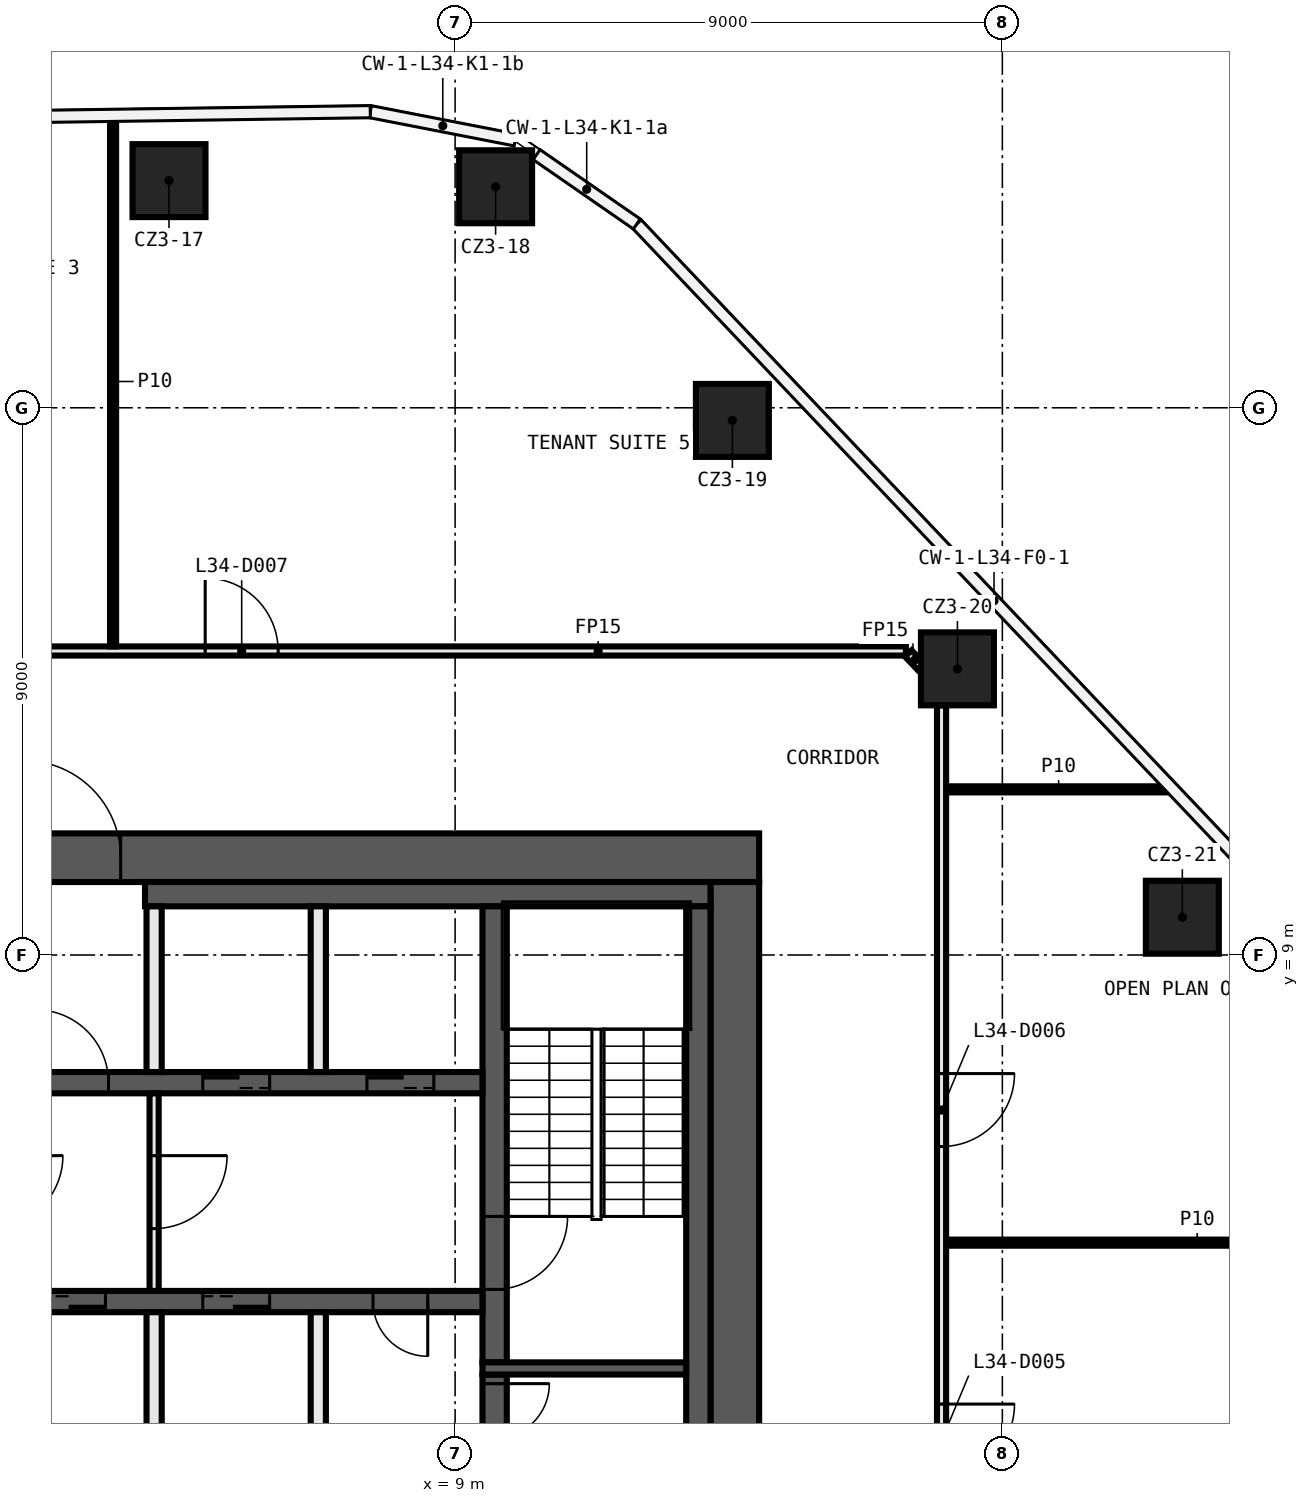
"""IFC4 building model, lengths in metres.
Left out: names, types, materials, properties, quantities, classifications, styles, units other than length and angle.
Written with IfcOpenShell. Run it as: python <this file> out.ifc"""

import sys

from ifc_helpers import new_model, si_unit, direction, frame, frame_2d, origin, origin_2d, place, context, subcontext, project, spatial, rectangle, extrude, element, fill, save


model = new_model("IFC4")
c1 = context("Model", 3, precision=1e-05, world=origin(), true_north=direction((0.0, 1.0)))
c2 = subcontext(c1, "Body", "Model", "MODEL_VIEW")
j1 = project(units=[si_unit("LENGTHUNIT", "METRE"), si_unit("PLANEANGLEUNIT", "RADIAN")], contexts=[c1])
p1 = place(None, origin())
s1 = spatial("IfcSite", under=j1, at=p1, CompositionType="ELEMENT")
p2 = place(p1, origin())
s2 = spatial("IfcBuilding", under=s1, at=p2, CompositionType="ELEMENT")
p3 = place(p2, frame((0.0, 0.0, 158.6)))
s3 = spatial("IfcBuildingStorey", under=s2, at=p3, CompositionType="ELEMENT", Elevation=158.6)
for number, where, z_axis, x_axis in (
    (1, (4.295, 21.736, 0.0), (0.0, 0.0, 1.0), (1.0, 0.0, 0.0)),
    (2, (9.666, 21.635, 0.0), (0.0, 0.0, 1.0), (1.0, 0.0, 0.0)),
    (3, (13.56, 17.792, 0.0), (0.0, 0.0, 1.0), (1.0, 0.0, 0.0)),
    (4, (17.261, 13.706, 0.0), (0.0, 0.0, 1.0), (1.0, 0.0, 0.0)),
    (5, (20.96, 9.621, 0.0), (0.0, 0.0, 1.0), (1.0, 0.0, 0.0)),
):
    element("IfcColumn", number, at=place(p3, frame(where, z_axis=z_axis, x_axis=x_axis)), inside=s3, PredefinedType="COLUMN", context=c2, shape_type="SweptSolid", body=[
        extrude(rectangle(XDim=1.2, YDim=1.2, at=origin_2d()), origin(), (0.0, 0.0, 1.0), 3.82),
    ])
p4 = place(p3, frame((17.075, 4.269, 0.0), z_axis=(0.0, 0.0, 1.0), x_axis=(1.0, 0.0, 0.0)))
e6 = element("IfcWall", 6, at=p4, inside=s3, PredefinedType="PARTITIONING", context=c2, shape_type="SweptSolid", body=[
    extrude(rectangle(XDim=8.259, YDim=0.1, at=frame_2d((4.129, 0.0))), origin(), (0.0, 0.0, 1.0), 3.82),
])
p5 = place(p3, frame((17.075, 11.724, 0.0), z_axis=(0.0, 0.0, 1.0), x_axis=(1.0, 0.0, 0.0)))
e7 = element("IfcWall", 7, at=p5, inside=s3, PredefinedType="PARTITIONING", context=c2, shape_type="SweptSolid", body=[
    extrude(rectangle(XDim=3.701, YDim=0.1, at=frame_2d((1.851, 0.0))), origin(), (0.0, 0.0, 1.0), 3.82),
])
p6 = place(p3, frame((-9.075, 14.0, 0.0), z_axis=(0.0, 0.0, 1.0), x_axis=(1.0, 0.0, 0.0)))
e8 = element("IfcWall", 8, at=p6, inside=s3, PredefinedType="PARTITIONING", context=c2, shape_type="SweptSolid", body=[
    extrude(rectangle(XDim=25.489, YDim=0.15, at=frame_2d((12.745, 0.0))), origin(), (0.0, 0.0, 1.0), 3.82),
])
p7 = place(p6, frame((13.965, 0.0, 0.0)))
e9 = element("IfcOpeningElement", 9, at=p7, cuts=e8, PredefinedType="OPENING", context=c2, shape_type="SweptSolid", body=[
    extrude(rectangle(XDim=1.2, YDim=2.1, at=frame_2d((0.6, 1.05))), frame((0.0, 0.085, 0.0), z_axis=(0.0, -1.0, 0.0), x_axis=(1.0, 0.0, 0.0)), (0.0, 0.0, 1.0), 0.17),
])
p8 = place(p6, frame((9.73, 0.0, 0.0)))
e10 = element("IfcOpeningElement", 10, at=p8, cuts=e8, PredefinedType="OPENING", context=c2, shape_type="SweptSolid", body=[
    extrude(rectangle(XDim=1.2, YDim=2.1, at=frame_2d((0.6, 1.05))), frame((0.0, 0.085, 0.0), z_axis=(0.0, -1.0, 0.0), x_axis=(1.0, 0.0, 0.0)), (0.0, 0.0, 1.0), 0.17),
])
p9 = place(p6, frame((5.49, 0.0, 0.0)))
e11 = element("IfcOpeningElement", 11, at=p9, cuts=e8, PredefinedType="OPENING", context=c2, shape_type="SweptSolid", body=[
    extrude(rectangle(XDim=1.2, YDim=2.1, at=frame_2d((0.6, 1.05))), frame((0.0, 0.085, 0.0), z_axis=(0.0, -1.0, 0.0), x_axis=(1.0, 0.0, 0.0)), (0.0, 0.0, 1.0), 0.17),
])
p10 = place(p3, frame((17.0, 13.106, 0.0), z_axis=(0.0, 0.0, 1.0), x_axis=(0.0, -1.0, 0.0)))
e12 = element("IfcWall", 12, at=p10, inside=s3, PredefinedType="PARTITIONING", context=c2, shape_type="SweptSolid", body=[
    extrude(rectangle(XDim=23.172, YDim=0.15, at=frame_2d((11.586, 0.0))), origin(), (0.0, 0.0, 1.0), 3.82),
])
p11 = place(p10, frame((11.492, 0.0, 0.0)))
e13 = element("IfcOpeningElement", 13, at=p11, cuts=e12, PredefinedType="OPENING", context=c2, shape_type="SweptSolid", body=[
    extrude(rectangle(XDim=1.2, YDim=2.1, at=frame_2d((0.6, 1.05))), frame((0.0, 0.085, 0.0), z_axis=(0.0, -1.0, 0.0), x_axis=(1.0, 0.0, 0.0)), (0.0, 0.0, 1.0), 0.17),
])
p12 = place(p10, frame((6.056, 0.0, 0.0)))
e14 = element("IfcOpeningElement", 14, at=p12, cuts=e12, PredefinedType="OPENING", context=c2, shape_type="SweptSolid", body=[
    extrude(rectangle(XDim=1.2, YDim=2.1, at=frame_2d((0.6, 1.05))), frame((0.0, 0.085, 0.0), z_axis=(0.0, -1.0, 0.0), x_axis=(1.0, 0.0, 0.0)), (0.0, 0.0, 1.0), 0.17),
])
p13 = place(p3, frame((3.375, 14.075, 0.0), z_axis=(0.0, 0.0, 1.0), x_axis=(0.0, 1.0, 0.0)))
e15 = element("IfcWall", 15, at=p13, inside=s3, PredefinedType="PARTITIONING", context=c2, shape_type="SweptSolid", body=[
    extrude(rectangle(XDim=8.715, YDim=0.1, at=frame_2d((4.357, 0.0))), origin(), (0.0, 0.0, 1.0), 3.82),
])
p14 = place(p3, frame((16.453, 13.959, 0.0), z_axis=(0.0, 0.0, 1.0), x_axis=(0.687856738642, -0.725846476264, 0.0)))
e16 = element("IfcWall", 16, at=p14, inside=s3, PredefinedType="PARTITIONING", context=c2, shape_type="SweptSolid", body=[
    extrude(rectangle(XDim=0.302, YDim=0.15, at=frame_2d((0.151, 0.0))), origin(), (0.0, 0.0, 1.0), 3.82),
])
p15 = place(p3, frame((-14.0, 10.6, 0.0), z_axis=(0.0, 0.0, 1.0), x_axis=(1.0, 0.0, 0.0)))
e17 = element("IfcWall", 17, at=p15, inside=s3, PredefinedType="SHEAR", context=c2, shape_type="SweptSolid", body=[
    extrude(rectangle(XDim=28.0, YDim=0.8, at=frame_2d((14.0, 0.0))), origin(), (0.0, 0.0, 1.0), 3.82),
])
p16 = place(p15, frame((15.9, 0.0, 0.0)))
e18 = element("IfcOpeningElement", 18, at=p16, cuts=e17, PredefinedType="OPENING", context=c2, shape_type="SweptSolid", body=[
    extrude(rectangle(XDim=1.6, YDim=2.1, at=frame_2d((0.8, 1.05))), frame((0.0, 0.41, 0.0), z_axis=(0.0, -1.0, 0.0), x_axis=(1.0, 0.0, 0.0)), (0.0, 0.0, 1.0), 0.82),
])
p17 = place(p3, frame((13.6, 10.2, 0.0), z_axis=(0.0, 0.0, 1.0), x_axis=(0.0, -1.0, 0.0)))
e19 = element("IfcWall", 19, at=p17, inside=s3, PredefinedType="SHEAR", context=c2, shape_type="SweptSolid", body=[
    extrude(rectangle(XDim=20.4, YDim=0.8, at=frame_2d((10.2, 0.0))), origin(), (0.0, 0.0, 1.0), 3.82),
])
p18 = place(p3, frame((3.9, 10.0, 0.0), z_axis=(0.0, 0.0, 1.0), x_axis=(1.0, 0.0, 0.0)))
e20 = element("IfcWall", 20, at=p18, inside=s3, PredefinedType="SHEAR", context=c2, shape_type="SweptSolid", body=[
    extrude(rectangle(XDim=9.3, YDim=0.4, at=frame_2d((4.65, 0.0))), origin(), (0.0, 0.0, 1.0), 3.82),
])
p19 = place(p3, frame((13.0, 9.8, 0.0), z_axis=(0.0, 0.0, 1.0), x_axis=(0.0, -1.0, 0.0)))
e21 = element("IfcWall", 21, at=p19, inside=s3, PredefinedType="SHEAR", context=c2, shape_type="SweptSolid", body=[
    extrude(rectangle(XDim=19.6, YDim=0.4, at=frame_2d((9.8, 0.0))), origin(), (0.0, 0.0, 1.0), 3.82),
])
p20 = place(p3, frame((9.65, 2.1, 0.0), z_axis=(0.0, 0.0, 1.0), x_axis=(0.0, -1.0, 0.0)))
e22 = element("IfcWall", 22, at=p20, inside=s3, PredefinedType="SHEAR", context=c2, shape_type="SweptSolid", body=[
    extrude(rectangle(XDim=4.2, YDim=0.4, at=frame_2d((2.1, 0.0))), origin(), (0.0, 0.0, 1.0), 3.82),
])
p21 = place(p20, frame((0.15, 0.0, 0.0)))
e23 = element("IfcOpeningElement", 23, at=p21, cuts=e22, PredefinedType="OPENING", context=c2, shape_type="SweptSolid", body=[
    extrude(rectangle(XDim=0.9, YDim=2.1, at=frame_2d((0.45, 1.05))), frame((0.0, 0.21, 0.0), z_axis=(0.0, -1.0, 0.0), x_axis=(1.0, 0.0, 0.0)), (0.0, 0.0, 1.0), 0.42),
])
p22 = place(p3, frame((9.65, 9.8, 0.0), z_axis=(0.0, 0.0, 1.0), x_axis=(0.0, -1.0, 0.0)))
e24 = element("IfcWall", 24, at=p22, inside=s3, PredefinedType="SHEAR", context=c2, shape_type="SweptSolid", body=[
    extrude(rectangle(XDim=7.5, YDim=0.4, at=frame_2d((3.75, 0.0))), origin(), (0.0, 0.0, 1.0), 3.82),
])
p23 = place(p22, frame((5.1, 0.0, 0.0)))
e25 = element("IfcOpeningElement", 25, at=p23, cuts=e24, PredefinedType="OPENING", context=c2, shape_type="SweptSolid", body=[
    extrude(rectangle(XDim=1.2, YDim=2.1, at=frame_2d((0.6, 1.05))), frame((0.0, 0.21, 0.0), z_axis=(0.0, -1.0, 0.0), x_axis=(1.0, 0.0, 0.0)), (0.0, 0.0, 1.0), 0.42),
])
p24 = place(p3, frame((9.45, 2.2, 0.0), z_axis=(0.0, 0.0, 1.0), x_axis=(1.0, 0.0, 0.0)))
e26 = element("IfcWall", 26, at=p24, inside=s3, PredefinedType="SHEAR", context=c2, shape_type="SweptSolid", body=[
    extrude(rectangle(XDim=3.35, YDim=0.2, at=frame_2d((1.675, 0.0))), origin(), (0.0, 0.0, 1.0), 3.82),
])
p25 = place(p3, frame((-9.45, 6.9, 0.0), z_axis=(0.0, 0.0, 1.0), x_axis=(1.0, 0.0, 0.0)))
e27 = element("IfcWall", 27, at=p25, inside=s3, PredefinedType="SHEAR", context=c2, shape_type="SweptSolid", body=[
    extrude(rectangle(XDim=18.9, YDim=0.35, at=frame_2d((9.45, 0.0))), origin(), (0.0, 0.0, 1.0), 3.82),
])
p26 = place(p25, frame((11.55, 0.0, 0.0)))
e28 = element("IfcOpeningElement", 28, at=p26, cuts=e27, PredefinedType="OPENING", context=c2, shape_type="SweptSolid", body=[
    extrude(rectangle(XDim=1.2, YDim=2.1, at=frame_2d((0.6, 1.05))), frame((0.0, 0.185, 0.0), z_axis=(0.0, -1.0, 0.0), x_axis=(1.0, 0.0, 0.0)), (0.0, 0.0, 1.0), 0.37),
])
p27 = place(p25, frame((14.3, 0.0, 0.0)))
e29 = element("IfcOpeningElement", 29, at=p27, cuts=e27, PredefinedType="OPENING", context=c2, shape_type="SweptSolid", body=[
    extrude(rectangle(XDim=1.1, YDim=2.1, at=frame_2d((0.55, 1.05))), frame((0.0, 0.185, 0.0), z_axis=(0.0, -1.0, 0.0), x_axis=(1.0, 0.0, 0.0)), (0.0, 0.0, 1.0), 0.37),
])
p28 = place(p25, frame((17.0, 0.0, 0.0)))
e30 = element("IfcOpeningElement", 30, at=p28, cuts=e27, PredefinedType="OPENING", context=c2, shape_type="SweptSolid", body=[
    extrude(rectangle(XDim=1.1, YDim=2.1, at=frame_2d((0.55, 1.05))), frame((0.0, 0.185, 0.0), z_axis=(0.0, -1.0, 0.0), x_axis=(1.0, 0.0, 0.0)), (0.0, 0.0, 1.0), 0.37),
])
p29 = place(p25, frame((2.25, 0.0, 0.0)))
e31 = element("IfcOpeningElement", 31, at=p29, cuts=e27, PredefinedType="OPENING", context=c2, shape_type="SweptSolid", body=[
    extrude(rectangle(XDim=0.9, YDim=2.1, at=frame_2d((0.45, 1.05))), frame((0.0, 0.185, 0.0), z_axis=(0.0, -1.0, 0.0), x_axis=(1.0, 0.0, 0.0)), (0.0, 0.0, 1.0), 0.37),
])
p30 = place(p25, frame((6.3, 0.0, 0.0)))
e32 = element("IfcOpeningElement", 32, at=p30, cuts=e27, PredefinedType="OPENING", context=c2, shape_type="SweptSolid", body=[
    extrude(rectangle(XDim=0.9, YDim=2.1, at=frame_2d((0.45, 1.05))), frame((0.0, 0.185, 0.0), z_axis=(0.0, -1.0, 0.0), x_axis=(1.0, 0.0, 0.0)), (0.0, 0.0, 1.0), 0.37),
])
p31 = place(p25, frame((9.0, 0.0, 0.0)))
e33 = element("IfcOpeningElement", 33, at=p31, cuts=e27, PredefinedType="OPENING", context=c2, shape_type="SweptSolid", body=[
    extrude(rectangle(XDim=0.9, YDim=2.1, at=frame_2d((0.45, 1.05))), frame((0.0, 0.185, 0.0), z_axis=(0.0, -1.0, 0.0), x_axis=(1.0, 0.0, 0.0)), (0.0, 0.0, 1.0), 0.37),
])
p32 = place(p3, frame((9.45, 3.3, 0.0), z_axis=(0.0, 0.0, 1.0), x_axis=(-1.0, 0.0, 0.0)))
e34 = element("IfcWall", 34, at=p32, inside=s3, PredefinedType="SHEAR", context=c2, shape_type="SweptSolid", body=[
    extrude(rectangle(XDim=18.9, YDim=0.35, at=frame_2d((9.45, 0.0))), origin(), (0.0, 0.0, 1.0), 3.82),
])
p33 = place(p32, frame((6.2, 0.0, 0.0)))
e35 = element("IfcOpeningElement", 35, at=p33, cuts=e34, PredefinedType="OPENING", context=c2, shape_type="SweptSolid", body=[
    extrude(rectangle(XDim=1.1, YDim=2.1, at=frame_2d((0.55, 1.05))), frame((0.0, 0.185, 0.0), z_axis=(0.0, -1.0, 0.0), x_axis=(1.0, 0.0, 0.0)), (0.0, 0.0, 1.0), 0.37),
])
p34 = place(p32, frame((3.5, 0.0, 0.0)))
e36 = element("IfcOpeningElement", 36, at=p34, cuts=e34, PredefinedType="OPENING", context=c2, shape_type="SweptSolid", body=[
    extrude(rectangle(XDim=1.1, YDim=2.1, at=frame_2d((0.55, 1.05))), frame((0.0, 0.185, 0.0), z_axis=(0.0, -1.0, 0.0), x_axis=(1.0, 0.0, 0.0)), (0.0, 0.0, 1.0), 0.37),
])
p35 = place(p32, frame((0.9, 0.0, 0.0)))
e37 = element("IfcOpeningElement", 37, at=p35, cuts=e34, PredefinedType="OPENING", context=c2, shape_type="SweptSolid", body=[
    extrude(rectangle(XDim=0.9, YDim=2.1, at=frame_2d((0.45, 1.05))), frame((0.0, 0.185, 0.0), z_axis=(0.0, -1.0, 0.0), x_axis=(1.0, 0.0, 0.0)), (0.0, 0.0, 1.0), 0.37),
])
p36 = place(p32, frame((15.75, 0.0, 0.0)))
e38 = element("IfcOpeningElement", 38, at=p36, cuts=e34, PredefinedType="OPENING", context=c2, shape_type="SweptSolid", body=[
    extrude(rectangle(XDim=0.9, YDim=2.1, at=frame_2d((0.45, 1.05))), frame((0.0, 0.185, 0.0), z_axis=(0.0, -1.0, 0.0), x_axis=(1.0, 0.0, 0.0)), (0.0, 0.0, 1.0), 0.37),
])
p37 = place(p32, frame((11.7, 0.0, 0.0)))
e39 = element("IfcOpeningElement", 39, at=p37, cuts=e34, PredefinedType="OPENING", context=c2, shape_type="SweptSolid", body=[
    extrude(rectangle(XDim=0.9, YDim=2.1, at=frame_2d((0.45, 1.05))), frame((0.0, 0.185, 0.0), z_axis=(0.0, -1.0, 0.0), x_axis=(1.0, 0.0, 0.0)), (0.0, 0.0, 1.0), 0.37),
])
p38 = place(p32, frame((9.0, 0.0, 0.0)))
e40 = element("IfcOpeningElement", 40, at=p38, cuts=e34, PredefinedType="OPENING", context=c2, shape_type="SweptSolid", body=[
    extrude(rectangle(XDim=0.9, YDim=2.1, at=frame_2d((0.45, 1.05))), frame((0.0, 0.185, 0.0), z_axis=(0.0, -1.0, 0.0), x_axis=(1.0, 0.0, 0.0)), (0.0, 0.0, 1.0), 0.37),
])
for number, where, z_axis, x_axis in (
    (41, (6.75, 0.4, 0.0), (0.0, 0.0, 1.0), (0.0, 1.0, 0.0)),
    (42, (6.75, 7.075, 0.0), (0.0, 0.0, 1.0), (0.0, 1.0, 0.0)),
):
    element("IfcWall", number, at=place(p3, frame(where, z_axis=z_axis, x_axis=x_axis)), inside=s3, PredefinedType="SOLIDWALL", context=c2, shape_type="SweptSolid", body=[
        extrude(rectangle(XDim=2.725, YDim=0.25, at=frame_2d((1.363, 0.0))), origin(), (0.0, 0.0, 1.0), 3.82),
    ])
p39 = place(p3, frame((4.05, 6.725, 0.0), z_axis=(0.0, 0.0, 1.0), x_axis=(0.0, -1.0, 0.0)))
e43 = element("IfcWall", 43, at=p39, inside=s3, PredefinedType="PARTITIONING", context=c2, shape_type="SweptSolid", body=[
    extrude(rectangle(XDim=3.25, YDim=0.15, at=frame_2d((1.625, 0.0))), origin(), (0.0, 0.0, 1.0), 3.82),
])
p40 = place(p39, frame((1.025, 0.0, 0.0)))
e44 = element("IfcOpeningElement", 44, at=p40, cuts=e43, PredefinedType="OPENING", context=c2, shape_type="SweptSolid", body=[
    extrude(rectangle(XDim=1.2, YDim=2.1, at=frame_2d((0.6, 1.05))), frame((0.0, 0.085, 0.0), z_axis=(0.0, -1.0, 0.0), x_axis=(1.0, 0.0, 0.0)), (0.0, 0.0, 1.0), 0.17),
])
for number, where, z_axis, x_axis in (
    (45, (4.05, 0.4, 0.0), (0.0, 0.0, 1.0), (0.0, 1.0, 0.0)),
    (46, (4.05, 7.075, 0.0), (0.0, 0.0, 1.0), (0.0, 1.0, 0.0)),
):
    element("IfcWall", number, at=place(p3, frame(where, z_axis=z_axis, x_axis=x_axis)), inside=s3, PredefinedType="SOLIDWALL", context=c2, shape_type="SweptSolid", body=[
        extrude(rectangle(XDim=2.725, YDim=0.25, at=frame_2d((1.363, 0.0))), origin(), (0.0, 0.0, 1.0), 3.82),
    ])
p41 = place(p11, origin())
e47 = element("IfcDoor", 47, at=p41, inside=s3, OperationType="SINGLE_SWING_RIGHT", PredefinedType="DOOR", context=c2, shape_type="SweptSolid", body=[
    extrude(rectangle(XDim=1.2, YDim=2.1, at=frame_2d((0.6, 1.05))), frame((0.0, 0.025, 0.0), z_axis=(0.0, -1.0, 0.0), x_axis=(1.0, 0.0, 0.0)), (0.0, 0.0, 1.0), 0.05),
])
fill(e13, e47)
p42 = place(p12, origin())
e48 = element("IfcDoor", 48, at=p42, inside=s3, OperationType="SINGLE_SWING_LEFT", PredefinedType="DOOR", context=c2, shape_type="SweptSolid", body=[
    extrude(rectangle(XDim=1.2, YDim=2.1, at=frame_2d((0.6, 1.05))), frame((0.0, 0.025, 0.0), z_axis=(0.0, -1.0, 0.0), x_axis=(1.0, 0.0, 0.0)), (0.0, 0.0, 1.0), 0.05),
])
fill(e14, e48)
p43 = place(p7, origin())
e49 = element("IfcDoor", 49, at=p43, inside=s3, OperationType="SINGLE_SWING_RIGHT", PredefinedType="DOOR", context=c2, shape_type="SweptSolid", body=[
    extrude(rectangle(XDim=1.2, YDim=2.1, at=frame_2d((0.6, 1.05))), frame((0.0, 0.025, 0.0), z_axis=(0.0, -1.0, 0.0), x_axis=(1.0, 0.0, 0.0)), (0.0, 0.0, 1.0), 0.05),
])
fill(e9, e49)
p44 = place(p21, origin())
e50 = element("IfcDoor", 50, at=p44, inside=s3, OperationType="SINGLE_SWING_RIGHT", PredefinedType="DOOR", context=c2, shape_type="SweptSolid", body=[
    extrude(rectangle(XDim=0.9, YDim=2.1, at=frame_2d((0.45, 1.05))), frame((0.0, 0.025, 0.0), z_axis=(0.0, -1.0, 0.0), x_axis=(1.0, 0.0, 0.0)), (0.0, 0.0, 1.0), 0.05),
])
fill(e23, e50)
p45 = place(p16, origin())
e51 = element("IfcDoor", 51, at=p45, inside=s3, OperationType="DOUBLE_DOOR_SINGLE_SWING", PredefinedType="DOOR", context=c2, shape_type="SweptSolid", body=[
    extrude(rectangle(XDim=1.6, YDim=2.1, at=frame_2d((0.8, 1.05))), frame((0.0, 0.025, 0.0), z_axis=(0.0, -1.0, 0.0), x_axis=(1.0, 0.0, 0.0)), (0.0, 0.0, 1.0), 0.05),
])
fill(e18, e51)
p46 = place(p26, origin())
e52 = element("IfcDoor", 52, at=p46, inside=s3, OperationType="SINGLE_SWING_LEFT", PredefinedType="DOOR", context=c2, shape_type="SweptSolid", body=[
    extrude(rectangle(XDim=1.2, YDim=2.1, at=frame_2d((0.6, 1.05))), frame((0.0, 0.025, 0.0), z_axis=(0.0, -1.0, 0.0), x_axis=(1.0, 0.0, 0.0)), (0.0, 0.0, 1.0), 0.05),
])
fill(e28, e52)
p47 = place(p27, origin())
e53 = element("IfcDoor", 53, at=p47, inside=s3, OperationType="DOUBLE_DOOR_SLIDING", PredefinedType="DOOR", context=c2, shape_type="SweptSolid", body=[
    extrude(rectangle(XDim=1.1, YDim=2.1, at=frame_2d((0.55, 1.05))), frame((0.0, 0.025, 0.0), z_axis=(0.0, -1.0, 0.0), x_axis=(1.0, 0.0, 0.0)), (0.0, 0.0, 1.0), 0.05),
])
fill(e29, e53)
p48 = place(p28, origin())
e54 = element("IfcDoor", 54, at=p48, inside=s3, OperationType="DOUBLE_DOOR_SLIDING", PredefinedType="DOOR", context=c2, shape_type="SweptSolid", body=[
    extrude(rectangle(XDim=1.1, YDim=2.1, at=frame_2d((0.55, 1.05))), frame((0.0, 0.025, 0.0), z_axis=(0.0, -1.0, 0.0), x_axis=(1.0, 0.0, 0.0)), (0.0, 0.0, 1.0), 0.05),
])
fill(e30, e54)
p49 = place(p33, origin())
e55 = element("IfcDoor", 55, at=p49, inside=s3, OperationType="DOUBLE_DOOR_SLIDING", PredefinedType="DOOR", context=c2, shape_type="SweptSolid", body=[
    extrude(rectangle(XDim=1.1, YDim=2.1, at=frame_2d((0.55, 1.05))), frame((0.0, 0.025, 0.0), z_axis=(0.0, -1.0, 0.0), x_axis=(1.0, 0.0, 0.0)), (0.0, 0.0, 1.0), 0.05),
])
fill(e35, e55)
p50 = place(p34, origin())
e56 = element("IfcDoor", 56, at=p50, inside=s3, OperationType="DOUBLE_DOOR_SLIDING", PredefinedType="DOOR", context=c2, shape_type="SweptSolid", body=[
    extrude(rectangle(XDim=1.1, YDim=2.1, at=frame_2d((0.55, 1.05))), frame((0.0, 0.025, 0.0), z_axis=(0.0, -1.0, 0.0), x_axis=(1.0, 0.0, 0.0)), (0.0, 0.0, 1.0), 0.05),
])
fill(e36, e56)
p51 = place(p35, origin())
e57 = element("IfcDoor", 57, at=p51, inside=s3, OperationType="SINGLE_SWING_LEFT", PredefinedType="DOOR", context=c2, shape_type="SweptSolid", body=[
    extrude(rectangle(XDim=0.9, YDim=2.1, at=frame_2d((0.45, 1.05))), frame((0.0, 0.025, 0.0), z_axis=(0.0, -1.0, 0.0), x_axis=(1.0, 0.0, 0.0)), (0.0, 0.0, 1.0), 0.05),
])
fill(e37, e57)
p52 = place(p23, origin())
e58 = element("IfcDoor", 58, at=p52, inside=s3, OperationType="SINGLE_SWING_LEFT", PredefinedType="DOOR", context=c2, shape_type="SweptSolid", body=[
    extrude(rectangle(XDim=1.2, YDim=2.1, at=frame_2d((0.6, 1.05))), frame((0.0, 0.025, 0.0), z_axis=(0.0, -1.0, 0.0), x_axis=(1.0, 0.0, 0.0)), (0.0, 0.0, 1.0), 0.05),
])
fill(e25, e58)
p53 = place(p40, origin())
e59 = element("IfcDoor", 59, at=p53, inside=s3, OperationType="SINGLE_SWING_RIGHT", PredefinedType="DOOR", context=c2, shape_type="SweptSolid", body=[
    extrude(rectangle(XDim=1.2, YDim=2.1, at=frame_2d((0.6, 1.05))), frame((0.0, 0.025, 0.0), z_axis=(0.0, -1.0, 0.0), x_axis=(1.0, 0.0, 0.0)), (0.0, 0.0, 1.0), 0.05),
])
fill(e44, e59)
save(model, sys.argv[1])
